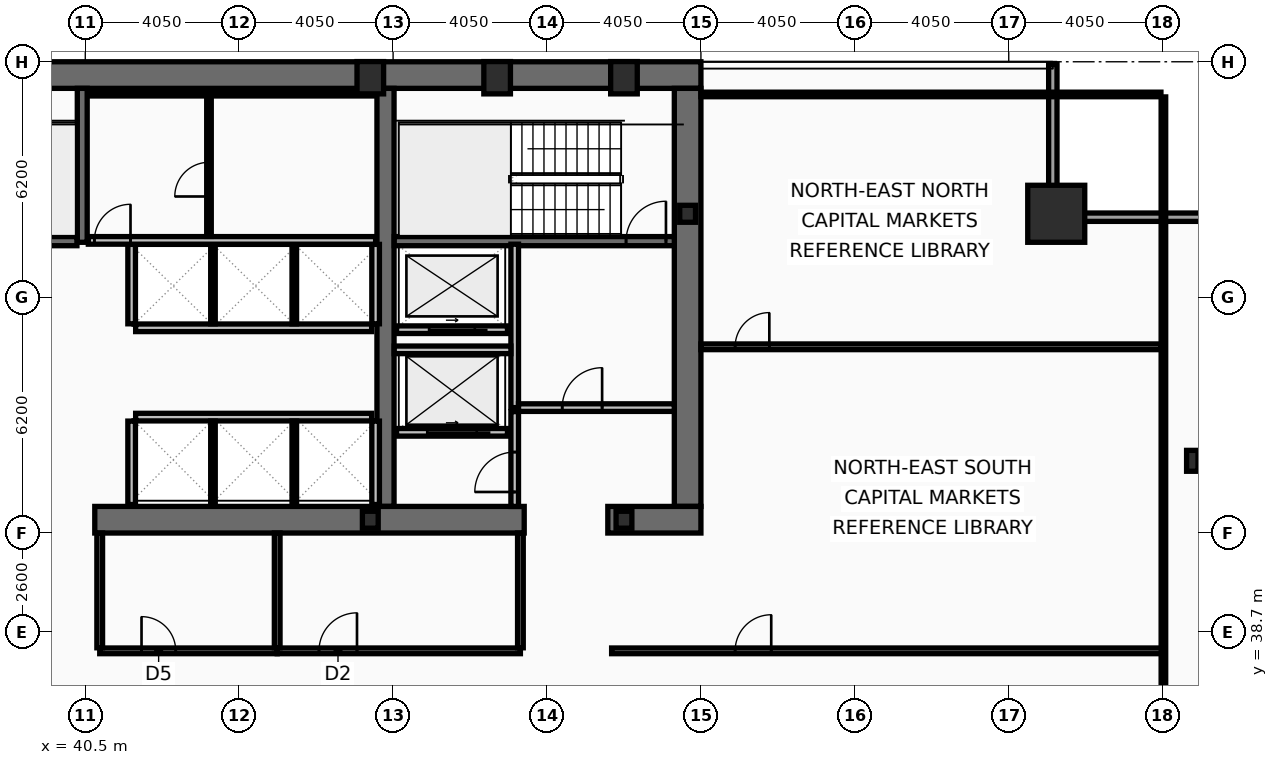
"""IFC4 building model, lengths in metres.
Left out: names, types, materials, properties, quantities, classifications, styles, units other than length and angle.
Written with IfcOpenShell. Run it as: python <this file> out.ifc"""

import sys

from ifc_helpers import new_model, si_unit, direction, frame, frame_2d, origin, origin_2d, place, context, subcontext, project, spatial, rectangle, hollow_rectangle, i_section, extrude, element, fill, save


model = new_model("IFC4")
c1 = context("Model", 3, precision=1e-05, world=origin(), true_north=direction((0.0, 1.0)))
c2 = subcontext(c1, "Body", "Model", "MODEL_VIEW")
j1 = project(units=[si_unit("LENGTHUNIT", "METRE"), si_unit("PLANEANGLEUNIT", "RADIAN")], contexts=[c1])
p1 = place(None, origin())
s1 = spatial("IfcSite", under=j1, at=p1, CompositionType="ELEMENT")
p2 = place(p1, origin())
s2 = spatial("IfcBuilding", under=s1, at=p2, CompositionType="ELEMENT")
p3 = place(p2, frame((0.0, 0.0, 118.2)))
s3 = spatial("IfcBuildingStorey", under=s2, at=p3, CompositionType="ELEMENT", Elevation=118.2)
p4 = place(p3, frame((16.2, 53.35, 0.0), z_axis=(0.0, 0.0, 1.0), x_axis=(1.0, 0.0, 0.0)))
e1 = element("IfcWall", 1, at=p4, inside=s3, PredefinedType="SHEAR", context=c2, shape_type="SweptSolid", body=[
    extrude(rectangle(XDim=40.5, YDim=0.7, at=frame_2d((20.25, 0.0))), origin(), (0.0, 0.0, 1.0), 3.44),
])
p5 = place(p3, frame((56.35, 53.0, 0.0), z_axis=(0.0, 0.0, 1.0), x_axis=(0.0, -1.0, 0.0)))
e2 = element("IfcWall", 2, at=p5, inside=s3, PredefinedType="SHEAR", context=c2, shape_type="SweptSolid", body=[
    extrude(rectangle(XDim=11.0, YDim=0.7, at=frame_2d((5.5, 0.0))), origin(), (0.0, 0.0, 1.0), 3.44),
])
p6 = place(p3, frame((48.4, 42.0, 0.0), z_axis=(0.0, 0.0, 1.0), x_axis=(0.0, 1.0, 0.0)))
e3 = element("IfcWall", 3, at=p6, inside=s3, PredefinedType="SHEAR", context=c2, shape_type="SweptSolid", body=[
    extrude(rectangle(XDim=11.0, YDim=0.45, at=frame_2d((5.5, 0.0))), origin(), (0.0, 0.0, 1.0), 3.44),
])
p7 = place(p3, frame((52.05, 41.65, 0.0), z_axis=(0.0, 0.0, 1.0), x_axis=(-1.0, 0.0, 0.0)))
e4 = element("IfcWall", 4, at=p7, inside=s3, PredefinedType="SHEAR", context=c2, shape_type="SweptSolid", body=[
    extrude(rectangle(XDim=11.3, YDim=0.7, at=frame_2d((5.65, 0.0))), origin(), (0.0, 0.0, 1.0), 3.44),
])
p8 = place(p3, frame((56.7, 41.65, 0.0), z_axis=(0.0, 0.0, 1.0), x_axis=(-1.0, 0.0, 0.0)))
e5 = element("IfcWall", 5, at=p8, inside=s3, PredefinedType="SHEAR", context=c2, shape_type="SweptSolid", body=[
    extrude(rectangle(XDim=2.45, YDim=0.7, at=frame_2d((1.225, 0.0))), origin(), (0.0, 0.0, 1.0), 3.44),
])
p9 = place(p3, frame((40.42, 48.95, 0.0), z_axis=(0.0, 0.0, 1.0), x_axis=(0.0, 1.0, 0.0)))
e6 = element("IfcWall", 6, at=p9, inside=s3, PredefinedType="SHEAR", context=c2, shape_type="SweptSolid", body=[
    extrude(rectangle(XDim=4.05, YDim=0.26, at=frame_2d((2.025, 0.0))), origin(), (0.0, 0.0, 1.0), 3.44),
])
p10 = place(p3, frame((48.63, 48.98, 0.0), z_axis=(0.0, 0.0, 1.0), x_axis=(1.0, 0.0, 0.0)))
e7 = element("IfcWall", 7, at=p10, inside=s3, PredefinedType="SHEAR", context=c2, shape_type="SweptSolid", body=[
    extrude(rectangle(XDim=7.37, YDim=0.24, at=frame_2d((3.685, 0.0))), origin(), (0.0, 0.0, 1.0), 3.44),
])
p11 = place(p10, frame((6.1, 0.0, 0.0)))
e8 = element("IfcOpeningElement", 8, at=p11, cuts=e7, PredefinedType="OPENING", context=c2, shape_type="SweptSolid", body=[
    extrude(rectangle(XDim=1.05, YDim=2.15, at=frame_2d((0.525, 1.075))), frame((0.0, 0.13, 0.0), z_axis=(0.0, -1.0, 0.0), x_axis=(1.0, 0.0, 0.0)), (0.0, 0.0, 1.0), 0.26),
])
p12 = place(p3, frame((32.72, 48.98, 0.0), z_axis=(0.0, 0.0, 1.0), x_axis=(1.0, 0.0, 0.0)))
e9 = element("IfcWall", 9, at=p12, inside=s3, PredefinedType="SHEAR", context=c2, shape_type="SweptSolid", body=[
    extrude(rectangle(XDim=7.56, YDim=0.24, at=frame_2d((3.78, 0.0))), origin(), (0.0, 0.0, 1.0), 3.44),
])
p13 = place(p12, frame((0.22, 0.0, 0.0)))
e10 = element("IfcOpeningElement", 10, at=p13, cuts=e9, PredefinedType="OPENING", context=c2, shape_type="SweptSolid", body=[
    extrude(rectangle(XDim=1.05, YDim=2.15, at=frame_2d((0.525, 1.075))), frame((0.0, 0.13, 0.0), z_axis=(0.0, -1.0, 0.0), x_axis=(1.0, 0.0, 0.0)), (0.0, 0.0, 1.0), 0.26),
])
p14 = place(p3, frame((66.05, 49.7, 0.0), z_axis=(0.0, 0.0, 1.0), x_axis=(1.0, 0.0, 0.0)))
e11 = element("IfcColumn", 11, at=p14, inside=s3, PredefinedType="COLUMN", context=c2, shape_type="SweptSolid", body=[
    extrude(hollow_rectangle(XDim=1.5, YDim=1.5, WallThickness=0.07, at=origin_2d()), origin(), (0.0, 0.0, 1.0), 3.6),
])
for number, where, z_axis, x_axis in (
    (12, (48.0, 53.28, 0.0), (0.0, 0.0, 1.0), (1.0, 0.0, 0.0)),
    (13, (51.337, 53.28, 0.0), (0.0, 0.0, 1.0), (1.0, 0.0, 0.0)),
    (14, (54.675, 53.28, 0.0), (0.0, 0.0, 1.0), (1.0, 0.0, 0.0)),
):
    element("IfcColumn", number, at=place(p3, frame(where, z_axis=z_axis, x_axis=x_axis)), inside=s3, PredefinedType="COLUMN", context=c2, shape_type="SweptSolid", body=[
        extrude(hollow_rectangle(XDim=0.7, YDim=0.85, WallThickness=0.05, at=origin_2d()), origin(), (0.0, 0.0, 1.0), 3.6),
    ])
p15 = place(p3, frame((69.63, 43.2, 0.0), z_axis=(0.0, 0.0, 1.0), x_axis=(1.0, 0.0, 0.0)))
e15 = element("IfcColumn", 15, at=p15, inside=s3, PredefinedType="COLUMN", context=c2, shape_type="SweptSolid", body=[
    extrude(i_section(OverallWidth=0.3, OverallDepth=0.55, WebThickness=0.015, FlangeThickness=0.029, at=origin_2d()), origin(), (0.0, 0.0, 1.0), 3.6),
])
for number, where, z_axis, x_axis in (
    (16, (56.35, 49.7, 0.0), (0.0, 0.0, 1.0), (1.0, 0.0, 0.0)),
    (17, (48.0, 41.65, 0.0), (0.0, 0.0, 1.0), (1.0, 0.0, 0.0)),
    (18, (54.675, 41.65, 0.0), (0.0, 0.0, 1.0), (1.0, 0.0, 0.0)),
):
    element("IfcColumn", number, at=place(p3, frame(where, z_axis=z_axis, x_axis=x_axis)), inside=s3, PredefinedType="COLUMN", context=c2, shape_type="SweptSolid", body=[
        extrude(i_section(OverallWidth=0.416, OverallDepth=0.446, WebThickness=0.039, FlangeThickness=0.063, at=origin_2d()), origin(), (0.0, 0.0, 1.0), 3.6),
    ])
p16 = place(p3, frame((65.96, 53.63, 0.0), z_axis=(0.0, 0.0, 1.0), x_axis=(0.0, -1.0, 0.0)))
e19 = element("IfcWall", 19, at=p16, inside=s3, PredefinedType="SOLIDWALL", context=c2, shape_type="SweptSolid", body=[
    extrude(rectangle(XDim=3.91, YDim=0.22, at=frame_2d((1.955, 0.0))), origin(), (0.0, 0.0, 1.0), 2.83),
])
p17 = place(p3, frame((65.85, 49.61, 0.0), z_axis=(0.0, 0.0, 1.0), x_axis=(1.0, 0.0, 0.0)))
e20 = element("IfcWall", 20, at=p17, inside=s3, PredefinedType="SOLIDWALL", context=c2, shape_type="SweptSolid", body=[
    extrude(rectangle(XDim=4.22, YDim=0.22, at=frame_2d((2.11, 0.0))), origin(), (0.0, 0.0, 1.0), 2.83),
])
p18 = place(p3, frame((51.61, 43.95, 0.0), z_axis=(0.0, 0.0, 1.0), x_axis=(-1.0, 0.0, 0.0)))
e21 = element("IfcWall", 21, at=p18, inside=s3, PredefinedType="PARTITIONING", context=c2, shape_type="SweptSolid", body=[
    extrude(rectangle(XDim=2.92, YDim=0.2, at=frame_2d((1.46, 0.0))), origin(), (0.0, 0.0, 1.0), 3.44),
])
p19 = place(p18, frame((0.81, 0.0, 0.0)))
e22 = element("IfcOpeningElement", 22, at=p19, cuts=e21, PredefinedType="OPENING", context=c2, shape_type="SweptSolid", body=[
    extrude(rectangle(XDim=1.3, YDim=2.18, at=frame_2d((0.65, 1.09))), frame((0.0, 0.11, 0.0), z_axis=(0.0, -1.0, 0.0), x_axis=(1.0, 0.0, 0.0)), (0.0, 0.0, 1.0), 0.22),
])
p20 = place(p3, frame((51.61, 46.65, 0.0), z_axis=(0.0, 0.0, 1.0), x_axis=(-1.0, 0.0, 0.0)))
e23 = element("IfcWall", 23, at=p20, inside=s3, PredefinedType="PARTITIONING", context=c2, shape_type="SweptSolid", body=[
    extrude(rectangle(XDim=2.92, YDim=0.2, at=frame_2d((1.46, 0.0))), origin(), (0.0, 0.0, 1.0), 3.44),
])
p21 = place(p20, frame((0.86, 0.0, 0.0)))
e24 = element("IfcOpeningElement", 24, at=p21, cuts=e23, PredefinedType="OPENING", context=c2, shape_type="SweptSolid", body=[
    extrude(rectangle(XDim=1.2, YDim=2.18, at=frame_2d((0.6, 1.09))), frame((0.0, 0.11, 0.0), z_axis=(0.0, -1.0, 0.0), x_axis=(1.0, 0.0, 0.0)), (0.0, 0.0, 1.0), 0.22),
])
p22 = place(p3, frame((51.8, 44.6, 0.0), z_axis=(0.0, 0.0, 1.0), x_axis=(0.0, 1.0, 0.0)))
e25 = element("IfcWall", 25, at=p22, inside=s3, PredefinedType="PARTITIONING", context=c2, shape_type="SweptSolid", body=[
    extrude(rectangle(XDim=4.3, YDim=0.2, at=frame_2d((2.15, 0.0))), origin(), (0.0, 0.0, 1.0), 3.44),
])
p23 = place(p3, frame((51.9, 44.6, 0.0), z_axis=(0.0, 0.0, 1.0), x_axis=(1.0, 0.0, 0.0)))
e26 = element("IfcWall", 26, at=p23, inside=s3, PredefinedType="PARTITIONING", context=c2, shape_type="SweptSolid", body=[
    extrude(rectangle(XDim=4.1, YDim=0.2, at=frame_2d((2.05, 0.0))), origin(), (0.0, 0.0, 1.0), 3.44),
])
p24 = place(p23, frame((1.15, 0.0, 0.0)))
e27 = element("IfcOpeningElement", 27, at=p24, cuts=e26, PredefinedType="OPENING", context=c2, shape_type="SweptSolid", body=[
    extrude(rectangle(XDim=1.05, YDim=2.15, at=frame_2d((0.525, 1.075))), frame((0.0, 0.11, 0.0), z_axis=(0.0, -1.0, 0.0), x_axis=(1.0, 0.0, 0.0)), (0.0, 0.0, 1.0), 0.22),
])
p25 = place(p3, frame((48.63, 46.12, 0.0), z_axis=(0.0, 0.0, 1.0), x_axis=(1.0, 0.0, 0.0)))
e28 = element("IfcWall", 28, at=p25, inside=s3, PredefinedType="PARTITIONING", context=c2, shape_type="SweptSolid", body=[
    extrude(rectangle(XDim=3.07, YDim=0.2, at=frame_2d((1.535, 0.0))), origin(), (0.0, 0.0, 1.0), 3.44),
])
p26 = place(p3, frame((51.8, 42.0, 0.0), z_axis=(0.0, 0.0, 1.0), x_axis=(0.0, 1.0, 0.0)))
e29 = element("IfcWall", 29, at=p26, inside=s3, PredefinedType="PARTITIONING", context=c2, shape_type="SweptSolid", body=[
    extrude(rectangle(XDim=2.495, YDim=0.2, at=frame_2d((1.248, 0.0))), origin(), (0.0, 0.0, 1.0), 3.44),
])
p27 = place(p26, frame((0.38, 0.0, 0.0)))
e30 = element("IfcOpeningElement", 30, at=p27, cuts=e29, PredefinedType="OPENING", context=c2, shape_type="SweptSolid", body=[
    extrude(rectangle(XDim=1.05, YDim=2.15, at=frame_2d((0.525, 1.075))), frame((0.0, 0.11, 0.0), z_axis=(0.0, -1.0, 0.0), x_axis=(1.0, 0.0, 0.0)), (0.0, 0.0, 1.0), 0.22),
])
p28 = place(p3, frame((41.825, 46.7, 0.0), z_axis=(0.0, 0.0, 1.0), x_axis=(1.0, 0.0, 0.0)))
e31 = element("IfcWall", 31, at=p28, inside=s3, PredefinedType="PARTITIONING", context=c2, shape_type="SweptSolid", body=[
    extrude(rectangle(XDim=6.21, YDim=0.2, at=frame_2d((3.105, 0.0))), origin(), (0.0, 0.0, 1.0), 3.44),
])
for number, where, z_axis, x_axis in (
    (32, (41.72, 46.805, 0.0), (0.0, 0.0, 1.0), (0.0, 1.0, 0.0)),
    (33, (48.14, 46.805, 0.0), (0.0, 0.0, 1.0), (0.0, 1.0, 0.0)),
):
    element("IfcWall", number, at=place(p3, frame(where, z_axis=z_axis, x_axis=x_axis)), inside=s3, PredefinedType="PARTITIONING", context=c2, shape_type="SweptSolid", body=[
        extrude(rectangle(XDim=2.09, YDim=0.2, at=frame_2d((1.045, 0.0))), origin(), (0.0, 0.0, 1.0), 3.44),
    ])
for number, where, z_axis, x_axis in (
    (34, (43.86, 46.805, 0.0), (0.0, 0.0, 1.0), (0.0, 1.0, 0.0)),
    (35, (46.0, 46.805, 0.0), (0.0, 0.0, 1.0), (0.0, 1.0, 0.0)),
):
    element("IfcWall", number, at=place(p3, frame(where, z_axis=z_axis, x_axis=x_axis)), inside=s3, PredefinedType="PARTITIONING", context=c2, shape_type="SweptSolid", body=[
        extrude(rectangle(XDim=2.09, YDim=0.12, at=frame_2d((1.045, 0.0))), origin(), (0.0, 0.0, 1.0), 3.44),
    ])
p29 = place(p3, frame((41.825, 44.35, 0.0), z_axis=(0.0, 0.0, 1.0), x_axis=(1.0, 0.0, 0.0)))
e36 = element("IfcWall", 36, at=p29, inside=s3, PredefinedType="PARTITIONING", context=c2, shape_type="SweptSolid", body=[
    extrude(rectangle(XDim=6.21, YDim=0.2, at=frame_2d((3.105, 0.0))), origin(), (0.0, 0.0, 1.0), 3.44),
])
for number, where, z_axis, x_axis in (
    (37, (41.72, 42.05, 0.0), (0.0, 0.0, 1.0), (0.0, 1.0, 0.0)),
    (38, (48.14, 42.05, 0.0), (0.0, 0.0, 1.0), (0.0, 1.0, 0.0)),
):
    element("IfcWall", number, at=place(p3, frame(where, z_axis=z_axis, x_axis=x_axis)), inside=s3, PredefinedType="PARTITIONING", context=c2, shape_type="SweptSolid", body=[
        extrude(rectangle(XDim=2.195, YDim=0.2, at=frame_2d((1.098, 0.0))), origin(), (0.0, 0.0, 1.0), 3.44),
    ])
for number, where, z_axis, x_axis in (
    (39, (43.86, 42.05, 0.0), (0.0, 0.0, 1.0), (0.0, 1.0, 0.0)),
    (40, (46.0, 42.05, 0.0), (0.0, 0.0, 1.0), (0.0, 1.0, 0.0)),
):
    element("IfcWall", number, at=place(p3, frame(where, z_axis=z_axis, x_axis=x_axis)), inside=s3, PredefinedType="PARTITIONING", context=c2, shape_type="SweptSolid", body=[
        extrude(rectangle(XDim=2.195, YDim=0.12, at=frame_2d((1.098, 0.0))), origin(), (0.0, 0.0, 1.0), 3.44),
    ])
p30 = place(p3, frame((40.58, 52.86, 0.0), z_axis=(0.0, 0.0, 1.0), x_axis=(1.0, 0.0, 0.0)))
e41 = element("IfcWall", 41, at=p30, inside=s3, PredefinedType="PARTITIONING", context=c2, shape_type="SweptSolid", body=[
    extrude(rectangle(XDim=7.56, YDim=0.12, at=frame_2d((3.78, 0.0))), origin(), (0.0, 0.0, 1.0), 3.44),
])
p31 = place(p3, frame((40.58, 49.0, 0.0), z_axis=(0.0, 0.0, 1.0), x_axis=(1.0, 0.0, 0.0)))
e42 = element("IfcWall", 42, at=p31, inside=s3, PredefinedType="PARTITIONING", context=c2, shape_type="SweptSolid", body=[
    extrude(rectangle(XDim=7.56, YDim=0.2, at=frame_2d((3.78, 0.0))), origin(), (0.0, 0.0, 1.0), 3.44),
])
p32 = place(p31, frame((0.16, 0.0, 0.0)))
e43 = element("IfcOpeningElement", 43, at=p32, cuts=e42, PredefinedType="OPENING", context=c2, shape_type="SweptSolid", body=[
    extrude(rectangle(XDim=0.95, YDim=2.1, at=frame_2d((0.475, 1.05))), frame((0.0, 0.11, 0.0), z_axis=(0.0, -1.0, 0.0), x_axis=(1.0, 0.0, 0.0)), (0.0, 0.0, 1.0), 0.22),
])
p33 = place(p3, frame((43.755, 49.105, 0.0), z_axis=(0.0, 0.0, 1.0), x_axis=(0.0, 1.0, 0.0)))
e44 = element("IfcWall", 44, at=p33, inside=s3, PredefinedType="PARTITIONING", context=c2, shape_type="SweptSolid", body=[
    extrude(rectangle(XDim=3.69, YDim=0.12, at=frame_2d((1.845, 0.0))), origin(), (0.0, 0.0, 1.0), 3.44),
])
p34 = place(p33, frame((1.05, 0.0, 0.0)))
e45 = element("IfcOpeningElement", 45, at=p34, cuts=e44, PredefinedType="OPENING", context=c2, shape_type="SweptSolid", body=[
    extrude(rectangle(XDim=0.9, YDim=2.05, at=frame_2d((0.45, 1.025))), frame((0.0, 0.07, 0.0), z_axis=(0.0, -1.0, 0.0), x_axis=(1.0, 0.0, 0.0)), (0.0, 0.0, 1.0), 0.14),
])
p35 = place(p3, frame((40.88, 38.2, 0.0), z_axis=(0.0, 0.0, 1.0), x_axis=(1.0, 0.0, 0.0)))
e46 = element("IfcWall", 46, at=p35, inside=s3, PredefinedType="PARTITIONING", context=c2, shape_type="SweptSolid", body=[
    extrude(rectangle(XDim=4.67, YDim=0.15, at=frame_2d((2.335, 0.0))), origin(), (0.0, 0.0, 1.0), 2.73),
])
p36 = place(p35, frame((1.1, 0.0, 0.0)))
e47 = element("IfcOpeningElement", 47, at=p36, cuts=e46, PredefinedType="OPENING", context=c2, shape_type="SweptSolid", body=[
    extrude(rectangle(XDim=0.9, YDim=2.05, at=frame_2d((0.45, 1.025))), frame((0.0, 0.085, 0.0), z_axis=(0.0, -1.0, 0.0), x_axis=(1.0, 0.0, 0.0)), (0.0, 0.0, 1.0), 0.17),
])
p37 = place(p3, frame((45.55, 38.2, 0.0), z_axis=(0.0, 0.0, 1.0), x_axis=(1.0, 0.0, 0.0)))
e48 = element("IfcWall", 48, at=p37, inside=s3, PredefinedType="PARTITIONING", context=c2, shape_type="SweptSolid", body=[
    extrude(rectangle(XDim=6.4, YDim=0.15, at=frame_2d((3.2, 0.0))), origin(), (0.0, 0.0, 1.0), 2.73),
])
p38 = place(p37, frame((1.1, 0.0, 0.0)))
e49 = element("IfcOpeningElement", 49, at=p38, cuts=e48, PredefinedType="OPENING", context=c2, shape_type="SweptSolid", body=[
    extrude(rectangle(XDim=1.0, YDim=2.05, at=frame_2d((0.5, 1.025))), frame((0.0, 0.085, 0.0), z_axis=(0.0, -1.0, 0.0), x_axis=(1.0, 0.0, 0.0)), (0.0, 0.0, 1.0), 0.17),
])
for number, where, z_axis, x_axis in (
    (50, (40.88, 38.28, 0.0), (0.0, 0.0, 1.0), (0.0, 1.0, 0.0)),
    (51, (45.55, 38.28, 0.0), (0.0, 0.0, 1.0), (0.0, 1.0, 0.0)),
    (52, (51.95, 38.28, 0.0), (0.0, 0.0, 1.0), (0.0, 1.0, 0.0)),
):
    element("IfcWall", number, at=place(p3, frame(where, z_axis=z_axis, x_axis=x_axis)), inside=s3, PredefinedType="PARTITIONING", context=c2, shape_type="SweptSolid", body=[
        extrude(rectangle(XDim=3.02, YDim=0.15, at=frame_2d((1.51, 0.0))), origin(), (0.0, 0.0, 1.0), 3.44),
    ])
p39 = place(p3, frame((54.35, 38.2, 0.0), z_axis=(0.0, 0.0, 1.0), x_axis=(1.0, 0.0, 0.0)))
e53 = element("IfcWall", 53, at=p39, inside=s3, PredefinedType="PARTITIONING", context=c2, shape_type="SweptSolid", body=[
    extrude(rectangle(XDim=14.52, YDim=0.15, at=frame_2d((7.26, 0.0))), origin(), (0.0, 0.0, 1.0), 2.73),
])
p40 = place(p39, frame((3.25, 0.0, 0.0)))
e54 = element("IfcOpeningElement", 54, at=p40, cuts=e53, PredefinedType="OPENING", context=c2, shape_type="SweptSolid", body=[
    extrude(rectangle(XDim=0.95, YDim=2.05, at=frame_2d((0.475, 1.025))), frame((0.0, 0.085, 0.0), z_axis=(0.0, -1.0, 0.0), x_axis=(1.0, 0.0, 0.0)), (0.0, 0.0, 1.0), 0.17),
])
p41 = place(p3, frame((56.7, 46.2, 0.0), z_axis=(0.0, 0.0, 1.0), x_axis=(1.0, 0.0, 0.0)))
e55 = element("IfcWall", 55, at=p41, inside=s3, PredefinedType="PARTITIONING", context=c2, shape_type="SweptSolid", body=[
    extrude(rectangle(XDim=12.105, YDim=0.15, at=frame_2d((6.052, 0.0))), origin(), (0.0, 0.0, 1.0), 2.83),
])
p42 = place(p41, frame((0.9, 0.0, 0.0)))
e56 = element("IfcOpeningElement", 56, at=p42, cuts=e55, PredefinedType="OPENING", context=c2, shape_type="SweptSolid", body=[
    extrude(rectangle(XDim=0.9, YDim=2.05, at=frame_2d((0.45, 1.025))), frame((0.0, 0.085, 0.0), z_axis=(0.0, -1.0, 0.0), x_axis=(1.0, 0.0, 0.0)), (0.0, 0.0, 1.0), 0.17),
])
p43 = place(p3, frame((68.87, 10.665, 0.0), z_axis=(0.0, 0.0, 1.0), x_axis=(0.0, 1.0, 0.0)))
e57 = element("IfcWall", 57, at=p43, inside=s3, PredefinedType="PARTITIONING", context=c2, shape_type="SweptSolid", body=[
    extrude(rectangle(XDim=42.11, YDim=0.12, at=frame_2d((21.055, 0.0))), origin(), (0.0, 0.0, 1.0), 2.73),
])
p44 = place(p3, frame((56.7, 52.84, 0.0), z_axis=(0.0, 0.0, 1.0), x_axis=(1.0, 0.0, 0.0)))
e58 = element("IfcWall", 58, at=p44, inside=s3, PredefinedType="PARTITIONING", context=c2, shape_type="SweptSolid", body=[
    extrude(rectangle(XDim=12.105, YDim=0.12, at=frame_2d((6.052, 0.0))), origin(), (0.0, 0.0, 1.0), 3.44),
])
p45 = place(p11, origin())
e59 = element("IfcDoor", 59, at=p45, inside=s3, OperationType="SINGLE_SWING_RIGHT", PredefinedType="DOOR", context=c2, shape_type="SweptSolid", body=[
    extrude(rectangle(XDim=1.05, YDim=2.15, at=frame_2d((0.525, 1.075))), frame((0.0, 0.025, 0.0), z_axis=(0.0, -1.0, 0.0), x_axis=(1.0, 0.0, 0.0)), (0.0, 0.0, 1.0), 0.05),
])
fill(e8, e59)
p46 = place(p19, origin())
e60 = element("IfcDoor", 60, at=p46, inside=s3, OperationType="SLIDING_TO_LEFT", PredefinedType="DOOR", context=c2, shape_type="SweptSolid", body=[
    extrude(rectangle(XDim=1.3, YDim=2.18, at=frame_2d((0.65, 1.09))), frame((0.0, 0.025, 0.0), z_axis=(0.0, -1.0, 0.0), x_axis=(1.0, 0.0, 0.0)), (0.0, 0.0, 1.0), 0.05),
])
fill(e22, e60)
p47 = place(p21, origin())
e61 = element("IfcDoor", 61, at=p47, inside=s3, OperationType="SLIDING_TO_LEFT", PredefinedType="DOOR", context=c2, shape_type="SweptSolid", body=[
    extrude(rectangle(XDim=1.2, YDim=2.18, at=frame_2d((0.6, 1.09))), frame((0.0, 0.025, 0.0), z_axis=(0.0, -1.0, 0.0), x_axis=(1.0, 0.0, 0.0)), (0.0, 0.0, 1.0), 0.05),
])
fill(e24, e61)
p48 = place(p24, origin())
e62 = element("IfcDoor", 62, at=p48, inside=s3, OperationType="SINGLE_SWING_RIGHT", PredefinedType="DOOR", context=c2, shape_type="SweptSolid", body=[
    extrude(rectangle(XDim=1.05, YDim=2.15, at=frame_2d((0.525, 1.075))), frame((0.0, 0.025, 0.0), z_axis=(0.0, -1.0, 0.0), x_axis=(1.0, 0.0, 0.0)), (0.0, 0.0, 1.0), 0.05),
])
fill(e27, e62)
p49 = place(p27, origin())
e63 = element("IfcDoor", 63, at=p49, inside=s3, OperationType="SINGLE_SWING_LEFT", PredefinedType="DOOR", context=c2, shape_type="SweptSolid", body=[
    extrude(rectangle(XDim=1.05, YDim=2.15, at=frame_2d((0.525, 1.075))), frame((0.0, 0.025, 0.0), z_axis=(0.0, -1.0, 0.0), x_axis=(1.0, 0.0, 0.0)), (0.0, 0.0, 1.0), 0.05),
])
fill(e30, e63)
p50 = place(p32, origin())
e64 = element("IfcDoor", 64, at=p50, inside=s3, OperationType="SINGLE_SWING_RIGHT", PredefinedType="DOOR", context=c2, shape_type="SweptSolid", body=[
    extrude(rectangle(XDim=0.95, YDim=2.1, at=frame_2d((0.475, 1.05))), frame((0.0, 0.025, 0.0), z_axis=(0.0, -1.0, 0.0), x_axis=(1.0, 0.0, 0.0)), (0.0, 0.0, 1.0), 0.05),
])
fill(e43, e64)
p51 = place(p34, origin())
e65 = element("IfcDoor", 65, at=p51, inside=s3, OperationType="SINGLE_SWING_LEFT", PredefinedType="DOOR", context=c2, shape_type="SweptSolid", body=[
    extrude(rectangle(XDim=0.9, YDim=2.05, at=frame_2d((0.45, 1.025))), frame((0.0, 0.025, 0.0), z_axis=(0.0, -1.0, 0.0), x_axis=(1.0, 0.0, 0.0)), (0.0, 0.0, 1.0), 0.05),
])
fill(e45, e65)
p52 = place(p36, origin())
e66 = element("IfcDoor", 66, at=p52, inside=s3, OperationType="SINGLE_SWING_LEFT", PredefinedType="DOOR", context=c2, shape_type="SweptSolid", body=[
    extrude(rectangle(XDim=0.9, YDim=2.05, at=frame_2d((0.45, 1.025))), frame((0.0, 0.025, 0.0), z_axis=(0.0, -1.0, 0.0), x_axis=(1.0, 0.0, 0.0)), (0.0, 0.0, 1.0), 0.05),
])
fill(e47, e66)
p53 = place(p38, origin())
e67 = element("IfcDoor", 67, at=p53, inside=s3, OperationType="SINGLE_SWING_RIGHT", PredefinedType="DOOR", context=c2, shape_type="SweptSolid", body=[
    extrude(rectangle(XDim=1.0, YDim=2.05, at=frame_2d((0.5, 1.025))), frame((0.0, 0.025, 0.0), z_axis=(0.0, -1.0, 0.0), x_axis=(1.0, 0.0, 0.0)), (0.0, 0.0, 1.0), 0.05),
])
fill(e49, e67)
p54 = place(p40, origin())
e68 = element("IfcDoor", 68, at=p54, inside=s3, OperationType="SINGLE_SWING_RIGHT", PredefinedType="DOOR", context=c2, shape_type="SweptSolid", body=[
    extrude(rectangle(XDim=0.95, YDim=2.05, at=frame_2d((0.475, 1.025))), frame((0.0, 0.025, 0.0), z_axis=(0.0, -1.0, 0.0), x_axis=(1.0, 0.0, 0.0)), (0.0, 0.0, 1.0), 0.05),
])
fill(e54, e68)
p55 = place(p42, origin())
e69 = element("IfcDoor", 69, at=p55, inside=s3, OperationType="SINGLE_SWING_RIGHT", PredefinedType="DOOR", context=c2, shape_type="SweptSolid", body=[
    extrude(rectangle(XDim=0.9, YDim=2.05, at=frame_2d((0.45, 1.025))), frame((0.0, 0.025, 0.0), z_axis=(0.0, -1.0, 0.0), x_axis=(1.0, 0.0, 0.0)), (0.0, 0.0, 1.0), 0.05),
])
fill(e56, e69)
save(model, sys.argv[1])
